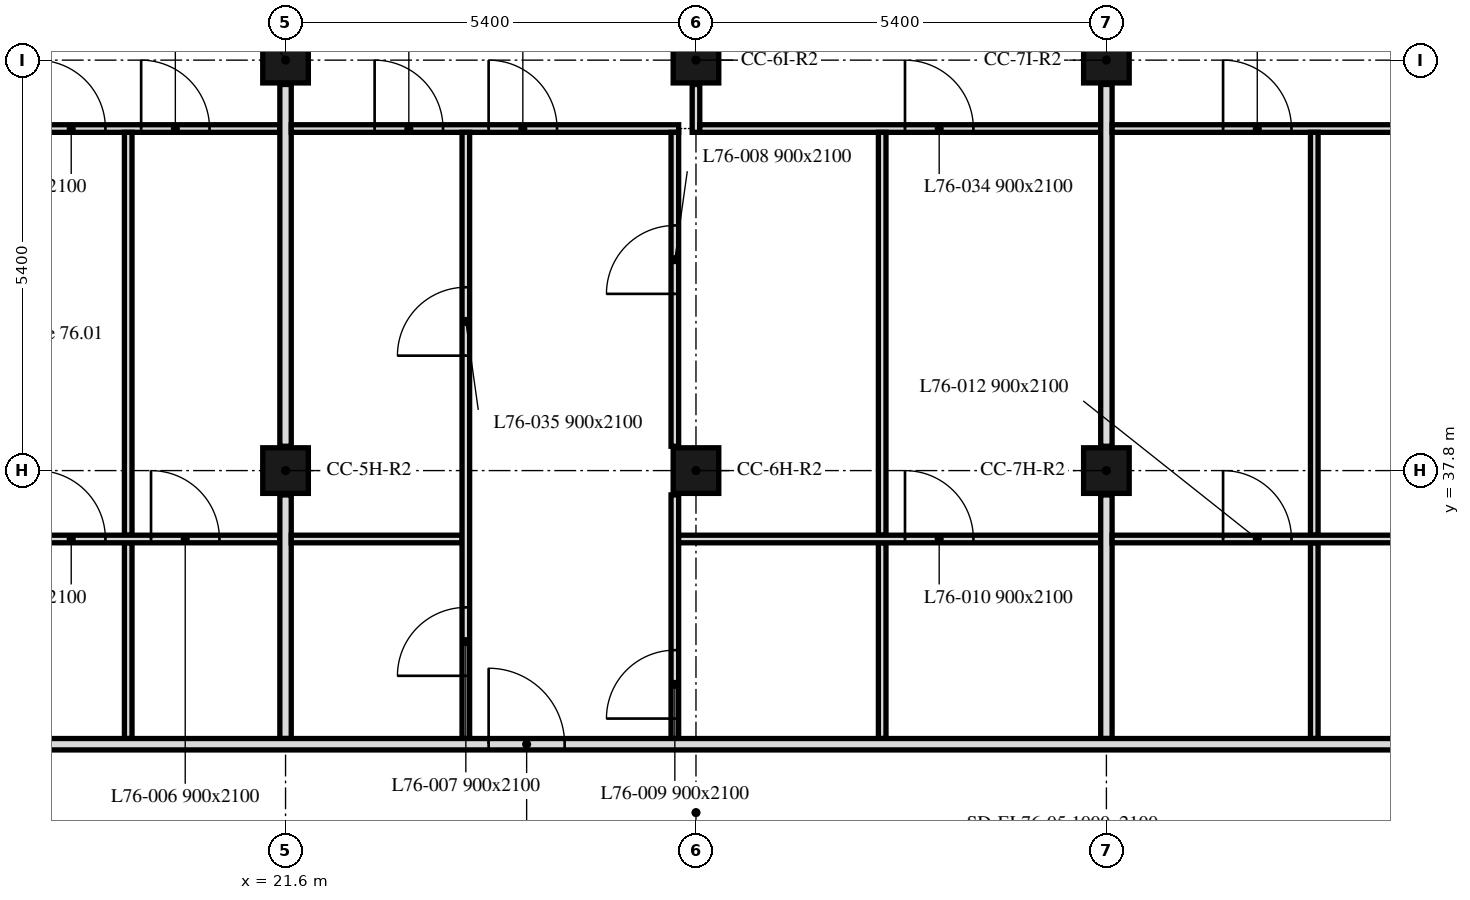
"""IFC4 building model, lengths in metres.
Left out: names, types, materials, properties, quantities, classifications, styles, units other than length and angle.
Written with IfcOpenShell. Run it as: python <this file> out.ifc"""

import sys

from ifc_helpers import new_model, si_unit, direction, frame, frame_2d, origin, origin_2d, place, context, subcontext, project, spatial, rectangle, extrude, element, fill, save


model = new_model("IFC4")
c1 = context("Model", 3, precision=1e-05, world=origin(), true_north=direction((0.0, 1.0)))
c2 = subcontext(c1, "Body", "Model", "MODEL_VIEW")
j1 = project(units=[si_unit("LENGTHUNIT", "METRE"), si_unit("PLANEANGLEUNIT", "RADIAN")], contexts=[c1])
p1 = place(None, origin())
s1 = spatial("IfcSite", under=j1, at=p1, CompositionType="ELEMENT")
p2 = place(p1, origin())
s2 = spatial("IfcBuilding", under=s1, at=p2, CompositionType="ELEMENT")
p3 = place(p2, frame((0.0, 0.0, 304.9)))
s3 = spatial("IfcBuildingStorey", under=s2, at=p3, CompositionType="ELEMENT", Elevation=304.9)
for number, where, z_axis, x_axis in (
    (1, (21.6, 37.8, 0.0), (0.0, 0.0, 1.0), (1.0, 0.0, 0.0)),
    (2, (27.0, 37.8, 0.0), (0.0, 0.0, 1.0), (1.0, 0.0, 0.0)),
    (3, (32.4, 37.8, 0.0), (0.0, 0.0, 1.0), (1.0, 0.0, 0.0)),
    (4, (21.6, 43.2, 0.0), (0.0, 0.0, 1.0), (1.0, 0.0, 0.0)),
    (5, (27.0, 43.2, 0.0), (0.0, 0.0, 1.0), (1.0, 0.0, 0.0)),
    (6, (32.4, 43.2, 0.0), (0.0, 0.0, 1.0), (1.0, 0.0, 0.0)),
):
    element("IfcColumn", number, at=place(p3, frame(where, z_axis=z_axis, x_axis=x_axis)), inside=s3, PredefinedType="COLUMN", context=c2, shape_type="SweptSolid", body=[
        extrude(rectangle(XDim=0.6, YDim=0.6, at=origin_2d()), origin(), (0.0, 0.0, 1.0), 2.8),
    ])
p4 = place(p3, frame((16.25, 42.3, 0.0), z_axis=(0.0, 0.0, 1.0), x_axis=(1.0, 0.0, 0.0)))
e7 = element("IfcWall", 7, at=p4, inside=s3, PredefinedType="PARTITIONING", context=c2, shape_type="SweptSolid", body=[
    extrude(rectangle(XDim=5.275, YDim=0.1, at=frame_2d((2.637, 0.0))), origin(), (0.0, 0.0, 1.0), 2.8),
])
p5 = place(p4, frame((2.08, 0.0, 0.0)))
e8 = element("IfcOpeningElement", 8, at=p5, cuts=e7, PredefinedType="OPENING", context=c2, shape_type="SweptSolid", body=[
    extrude(rectangle(XDim=0.9, YDim=2.1, at=frame_2d((0.45, 1.05))), frame((0.0, 0.05, 0.0), z_axis=(0.0, -1.0, 0.0), x_axis=(1.0, 0.0, 0.0)), (0.0, 0.0, 1.0), 0.1),
])
p6 = place(p4, frame((3.45, 0.0, 0.0)))
e9 = element("IfcOpeningElement", 9, at=p6, cuts=e7, PredefinedType="OPENING", context=c2, shape_type="SweptSolid", body=[
    extrude(rectangle(XDim=0.9, YDim=2.1, at=frame_2d((0.45, 1.05))), frame((0.0, 0.05, 0.0), z_axis=(0.0, -1.0, 0.0), x_axis=(1.0, 0.0, 0.0)), (0.0, 0.0, 1.0), 0.1),
])
p7 = place(p3, frame((19.53, 36.95, 0.0), z_axis=(0.0, 0.0, 1.0), x_axis=(0.0, 1.0, 0.0)))
e10 = element("IfcWall", 10, at=p7, inside=s3, PredefinedType="PARTITIONING", context=c2, shape_type="SweptSolid", body=[
    extrude(rectangle(XDim=5.3, YDim=0.1, at=frame_2d((2.65, 0.0))), origin(), (0.0, 0.0, 1.0), 2.8),
])
p8 = place(p3, frame((19.53, 34.275, 0.0), z_axis=(0.0, 0.0, 1.0), x_axis=(0.0, 1.0, 0.0)))
e11 = element("IfcWall", 11, at=p8, inside=s3, PredefinedType="PARTITIONING", context=c2, shape_type="SweptSolid", body=[
    extrude(rectangle(XDim=2.575, YDim=0.1, at=frame_2d((1.288, 0.0))), origin(), (0.0, 0.0, 1.0), 2.8),
])
p9 = place(p3, frame((16.13, 36.9, 0.0), z_axis=(0.0, 0.0, 1.0), x_axis=(1.0, 0.0, 0.0)))
e12 = element("IfcWall", 12, at=p9, inside=s3, PredefinedType="PARTITIONING", context=c2, shape_type="SweptSolid", body=[
    extrude(rectangle(XDim=5.395, YDim=0.1, at=frame_2d((2.698, 0.0))), origin(), (0.0, 0.0, 1.0), 2.8),
])
p10 = place(p9, frame((2.2, 0.0, 0.0)))
e13 = element("IfcOpeningElement", 13, at=p10, cuts=e12, PredefinedType="OPENING", context=c2, shape_type="SweptSolid", body=[
    extrude(rectangle(XDim=0.9, YDim=2.1, at=frame_2d((0.45, 1.05))), frame((0.0, 0.05, 0.0), z_axis=(0.0, -1.0, 0.0), x_axis=(1.0, 0.0, 0.0)), (0.0, 0.0, 1.0), 0.1),
])
p11 = place(p9, frame((3.7, 0.0, 0.0)))
e14 = element("IfcOpeningElement", 14, at=p11, cuts=e12, PredefinedType="OPENING", context=c2, shape_type="SweptSolid", body=[
    extrude(rectangle(XDim=0.9, YDim=2.1, at=frame_2d((0.45, 1.05))), frame((0.0, 0.05, 0.0), z_axis=(0.0, -1.0, 0.0), x_axis=(1.0, 0.0, 0.0)), (0.0, 0.0, 1.0), 0.1),
])
p12 = place(p3, frame((21.6, 38.12, 0.0), z_axis=(0.0, 0.0, 1.0), x_axis=(0.0, 1.0, 0.0)))
e15 = element("IfcWall", 15, at=p12, inside=s3, PredefinedType="PARTITIONING", context=c2, shape_type="SweptSolid", body=[
    extrude(rectangle(XDim=4.76, YDim=0.15, at=frame_2d((2.38, 0.0))), origin(), (0.0, 0.0, 1.0), 2.2),
])
p13 = place(p3, frame((21.6, 34.275, 0.0), z_axis=(0.0, 0.0, 1.0), x_axis=(0.0, 1.0, 0.0)))
e16 = element("IfcWall", 16, at=p13, inside=s3, PredefinedType="PARTITIONING", context=c2, shape_type="SweptSolid", body=[
    extrude(rectangle(XDim=3.205, YDim=0.15, at=frame_2d((1.603, 0.0))), origin(), (0.0, 0.0, 1.0), 2.2),
])
p14 = place(p3, frame((21.675, 42.3, 0.0), z_axis=(0.0, 0.0, 1.0), x_axis=(1.0, 0.0, 0.0)))
e17 = element("IfcWall", 17, at=p14, inside=s3, PredefinedType="PARTITIONING", context=c2, shape_type="SweptSolid", body=[
    extrude(rectangle(XDim=5.097, YDim=0.1, at=frame_2d((2.548, 0.0))), origin(), (0.0, 0.0, 1.0), 2.8),
])
p15 = place(p14, frame((1.097, 0.0, 0.0)))
e18 = element("IfcOpeningElement", 18, at=p15, cuts=e17, PredefinedType="OPENING", context=c2, shape_type="SweptSolid", body=[
    extrude(rectangle(XDim=0.9, YDim=2.1, at=frame_2d((0.45, 1.05))), frame((0.0, 0.05, 0.0), z_axis=(0.0, -1.0, 0.0), x_axis=(1.0, 0.0, 0.0)), (0.0, 0.0, 1.0), 0.1),
])
p16 = place(p14, frame((2.597, 0.0, 0.0)))
e19 = element("IfcOpeningElement", 19, at=p16, cuts=e17, PredefinedType="OPENING", context=c2, shape_type="SweptSolid", body=[
    extrude(rectangle(XDim=0.9, YDim=2.1, at=frame_2d((0.45, 1.05))), frame((0.0, 0.05, 0.0), z_axis=(0.0, -1.0, 0.0), x_axis=(1.0, 0.0, 0.0)), (0.0, 0.0, 1.0), 0.1),
])
p17 = place(p3, frame((27.0, 42.25, 0.0), z_axis=(0.0, 0.0, 1.0), x_axis=(0.0, 1.0, 0.0)))
e20 = element("IfcWall", 20, at=p17, inside=s3, PredefinedType="PARTITIONING", context=c2, shape_type="SweptSolid", body=[
    extrude(rectangle(XDim=0.63, YDim=0.1, at=frame_2d((0.315, 0.0))), origin(), (0.0, 0.0, 1.0), 2.2),
])
p18 = place(p3, frame((27.05, 42.3, 0.0), z_axis=(0.0, 0.0, 1.0), x_axis=(1.0, 0.0, 0.0)))
e21 = element("IfcWall", 21, at=p18, inside=s3, PredefinedType="PARTITIONING", context=c2, shape_type="SweptSolid", body=[
    extrude(rectangle(XDim=5.275, YDim=0.1, at=frame_2d((2.637, 0.0))), origin(), (0.0, 0.0, 1.0), 2.8),
])
p19 = place(p18, frame((2.7, 0.0, 0.0)))
e22 = element("IfcOpeningElement", 22, at=p19, cuts=e21, PredefinedType="OPENING", context=c2, shape_type="SweptSolid", body=[
    extrude(rectangle(XDim=0.9, YDim=2.1, at=frame_2d((0.45, 1.05))), frame((0.0, 0.05, 0.0), z_axis=(0.0, -1.0, 0.0), x_axis=(1.0, 0.0, 0.0)), (0.0, 0.0, 1.0), 0.1),
])
p20 = place(p3, frame((21.675, 36.9, 0.0), z_axis=(0.0, 0.0, 1.0), x_axis=(1.0, 0.0, 0.0)))
e23 = element("IfcWall", 23, at=p20, inside=s3, PredefinedType="PARTITIONING", context=c2, shape_type="SweptSolid", body=[
    extrude(rectangle(XDim=2.247, YDim=0.1, at=frame_2d((1.124, 0.0))), origin(), (0.0, 0.0, 1.0), 2.8),
])
p21 = place(p3, frame((23.972, 34.275, 0.0), z_axis=(0.0, 0.0, 1.0), x_axis=(0.0, 1.0, 0.0)))
e24 = element("IfcWall", 24, at=p21, inside=s3, PredefinedType="PARTITIONING", context=c2, shape_type="SweptSolid", body=[
    extrude(rectangle(XDim=7.975, YDim=0.1, at=frame_2d((3.988, 0.0))), origin(), (0.0, 0.0, 1.0), 2.8),
])
p22 = place(p21, frame((0.825, 0.0, 0.0)))
e25 = element("IfcOpeningElement", 25, at=p22, cuts=e24, PredefinedType="OPENING", context=c2, shape_type="SweptSolid", body=[
    extrude(rectangle(XDim=0.9, YDim=2.1, at=frame_2d((0.45, 1.05))), frame((0.0, 0.05, 0.0), z_axis=(0.0, -1.0, 0.0), x_axis=(1.0, 0.0, 0.0)), (0.0, 0.0, 1.0), 0.1),
])
p23 = place(p21, frame((5.037, 0.0, 0.0)))
e26 = element("IfcOpeningElement", 26, at=p23, cuts=e24, PredefinedType="OPENING", context=c2, shape_type="SweptSolid", body=[
    extrude(rectangle(XDim=0.9, YDim=2.1, at=frame_2d((0.45, 1.05))), frame((0.0, 0.05, 0.0), z_axis=(0.0, -1.0, 0.0), x_axis=(1.0, 0.0, 0.0)), (0.0, 0.0, 1.0), 0.1),
])
p24 = place(p3, frame((26.722, 34.275, 0.0), z_axis=(0.0, 0.0, 1.0), x_axis=(0.0, 1.0, 0.0)))
e27 = element("IfcWall", 27, at=p24, inside=s3, PredefinedType="PARTITIONING", context=c2, shape_type="SweptSolid", body=[
    extrude(rectangle(XDim=3.205, YDim=0.1, at=frame_2d((1.603, 0.0))), origin(), (0.0, 0.0, 1.0), 2.8),
])
p25 = place(p24, frame((0.262, 0.0, 0.0)))
e28 = element("IfcOpeningElement", 28, at=p25, cuts=e27, PredefinedType="OPENING", context=c2, shape_type="SweptSolid", body=[
    extrude(rectangle(XDim=0.9, YDim=2.1, at=frame_2d((0.45, 1.05))), frame((0.0, 0.05, 0.0), z_axis=(0.0, -1.0, 0.0), x_axis=(1.0, 0.0, 0.0)), (0.0, 0.0, 1.0), 0.1),
])
p26 = place(p3, frame((26.722, 38.12, 0.0), z_axis=(0.0, 0.0, 1.0), x_axis=(0.0, 1.0, 0.0)))
e29 = element("IfcWall", 29, at=p26, inside=s3, PredefinedType="PARTITIONING", context=c2, shape_type="SweptSolid", body=[
    extrude(rectangle(XDim=4.13, YDim=0.1, at=frame_2d((2.065, 0.0))), origin(), (0.0, 0.0, 1.0), 2.8),
])
p27 = place(p26, frame((2.005, 0.0, 0.0)))
e30 = element("IfcOpeningElement", 30, at=p27, cuts=e29, PredefinedType="OPENING", context=c2, shape_type="SweptSolid", body=[
    extrude(rectangle(XDim=0.9, YDim=2.1, at=frame_2d((0.45, 1.05))), frame((0.0, 0.05, 0.0), z_axis=(0.0, -1.0, 0.0), x_axis=(1.0, 0.0, 0.0)), (0.0, 0.0, 1.0), 0.1),
])
p28 = place(p3, frame((29.45, 36.95, 0.0), z_axis=(0.0, 0.0, 1.0), x_axis=(0.0, 1.0, 0.0)))
e31 = element("IfcWall", 31, at=p28, inside=s3, PredefinedType="PARTITIONING", context=c2, shape_type="SweptSolid", body=[
    extrude(rectangle(XDim=5.3, YDim=0.1, at=frame_2d((2.65, 0.0))), origin(), (0.0, 0.0, 1.0), 2.8),
])
p29 = place(p3, frame((29.45, 34.275, 0.0), z_axis=(0.0, 0.0, 1.0), x_axis=(0.0, 1.0, 0.0)))
e32 = element("IfcWall", 32, at=p29, inside=s3, PredefinedType="PARTITIONING", context=c2, shape_type="SweptSolid", body=[
    extrude(rectangle(XDim=2.575, YDim=0.1, at=frame_2d((1.288, 0.0))), origin(), (0.0, 0.0, 1.0), 2.8),
])
p30 = place(p3, frame((26.772, 36.9, 0.0), z_axis=(0.0, 0.0, 1.0), x_axis=(1.0, 0.0, 0.0)))
e33 = element("IfcWall", 33, at=p30, inside=s3, PredefinedType="PARTITIONING", context=c2, shape_type="SweptSolid", body=[
    extrude(rectangle(XDim=5.553, YDim=0.1, at=frame_2d((2.776, 0.0))), origin(), (0.0, 0.0, 1.0), 2.2),
])
p31 = place(p30, frame((2.978, 0.0, 0.0)))
e34 = element("IfcOpeningElement", 34, at=p31, cuts=e33, PredefinedType="OPENING", context=c2, shape_type="SweptSolid", body=[
    extrude(rectangle(XDim=0.9, YDim=2.1, at=frame_2d((0.45, 1.05))), frame((0.0, 0.05, 0.0), z_axis=(0.0, -1.0, 0.0), x_axis=(1.0, 0.0, 0.0)), (0.0, 0.0, 1.0), 0.1),
])
p32 = place(p3, frame((32.4, 38.12, 0.0), z_axis=(0.0, 0.0, 1.0), x_axis=(0.0, 1.0, 0.0)))
e35 = element("IfcWall", 35, at=p32, inside=s3, PredefinedType="PARTITIONING", context=c2, shape_type="SweptSolid", body=[
    extrude(rectangle(XDim=4.76, YDim=0.15, at=frame_2d((2.38, 0.0))), origin(), (0.0, 0.0, 1.0), 2.2),
])
p33 = place(p3, frame((32.4, 34.275, 0.0), z_axis=(0.0, 0.0, 1.0), x_axis=(0.0, 1.0, 0.0)))
e36 = element("IfcWall", 36, at=p33, inside=s3, PredefinedType="PARTITIONING", context=c2, shape_type="SweptSolid", body=[
    extrude(rectangle(XDim=3.205, YDim=0.15, at=frame_2d((1.603, 0.0))), origin(), (0.0, 0.0, 1.0), 2.2),
])
p34 = place(p3, frame((32.475, 42.3, 0.0), z_axis=(0.0, 0.0, 1.0), x_axis=(1.0, 0.0, 0.0)))
e37 = element("IfcWall", 37, at=p34, inside=s3, PredefinedType="PARTITIONING", context=c2, shape_type="SweptSolid", body=[
    extrude(rectangle(XDim=5.21, YDim=0.1, at=frame_2d((2.605, 0.0))), origin(), (0.0, 0.0, 1.0), 2.8),
])
p35 = place(p34, frame((1.46, 0.0, 0.0)))
e38 = element("IfcOpeningElement", 38, at=p35, cuts=e37, PredefinedType="OPENING", context=c2, shape_type="SweptSolid", body=[
    extrude(rectangle(XDim=0.9, YDim=2.1, at=frame_2d((0.45, 1.05))), frame((0.0, 0.05, 0.0), z_axis=(0.0, -1.0, 0.0), x_axis=(1.0, 0.0, 0.0)), (0.0, 0.0, 1.0), 0.1),
])
p36 = place(p3, frame((35.135, 36.95, 0.0), z_axis=(0.0, 0.0, 1.0), x_axis=(0.0, 1.0, 0.0)))
e39 = element("IfcWall", 39, at=p36, inside=s3, PredefinedType="PARTITIONING", context=c2, shape_type="SweptSolid", body=[
    extrude(rectangle(XDim=5.3, YDim=0.1, at=frame_2d((2.65, 0.0))), origin(), (0.0, 0.0, 1.0), 2.2),
])
p37 = place(p3, frame((35.135, 34.275, 0.0), z_axis=(0.0, 0.0, 1.0), x_axis=(0.0, 1.0, 0.0)))
e40 = element("IfcWall", 40, at=p37, inside=s3, PredefinedType="PARTITIONING", context=c2, shape_type="SweptSolid", body=[
    extrude(rectangle(XDim=2.575, YDim=0.1, at=frame_2d((1.288, 0.0))), origin(), (0.0, 0.0, 1.0), 2.8),
])
p38 = place(p3, frame((32.475, 36.9, 0.0), z_axis=(0.0, 0.0, 1.0), x_axis=(1.0, 0.0, 0.0)))
e41 = element("IfcWall", 41, at=p38, inside=s3, PredefinedType="PARTITIONING", context=c2, shape_type="SweptSolid", body=[
    extrude(rectangle(XDim=5.11, YDim=0.1, at=frame_2d((2.555, 0.0))), origin(), (0.0, 0.0, 1.0), 2.8),
])
p39 = place(p38, frame((1.46, 0.0, 0.0)))
e42 = element("IfcOpeningElement", 42, at=p39, cuts=e41, PredefinedType="OPENING", context=c2, shape_type="SweptSolid", body=[
    extrude(rectangle(XDim=0.9, YDim=2.1, at=frame_2d((0.45, 1.05))), frame((0.0, 0.05, 0.0), z_axis=(0.0, -1.0, 0.0), x_axis=(1.0, 0.0, 0.0)), (0.0, 0.0, 1.0), 0.1),
])
p40 = place(p3, frame((6.151, 34.2, 0.0), z_axis=(0.0, 0.0, 1.0), x_axis=(1.0, 0.0, 0.0)))
e43 = element("IfcWall", 43, at=p40, inside=s3, PredefinedType="PARTITIONING", context=c2, shape_type="SweptSolid", body=[
    extrude(rectangle(XDim=41.698, YDim=0.15, at=frame_2d((20.849, 0.0))), origin(), (0.0, 0.0, 1.0), 2.2),
])
p41 = place(p40, frame((2.939, 0.0, 0.0)))
e44 = element("IfcOpeningElement", 44, at=p41, cuts=e43, PredefinedType="OPENING", context=c2, shape_type="SweptSolid", body=[
    extrude(rectangle(XDim=1.0, YDim=2.1, at=frame_2d((0.5, 1.05))), frame((0.0, 0.075, 0.0), z_axis=(0.0, -1.0, 0.0), x_axis=(1.0, 0.0, 0.0)), (0.0, 0.0, 1.0), 0.15),
])
p42 = place(p40, frame((18.121, 0.0, 0.0)))
e45 = element("IfcOpeningElement", 45, at=p42, cuts=e43, PredefinedType="OPENING", context=c2, shape_type="SweptSolid", body=[
    extrude(rectangle(XDim=1.0, YDim=2.1, at=frame_2d((0.5, 1.05))), frame((0.0, 0.075, 0.0), z_axis=(0.0, -1.0, 0.0), x_axis=(1.0, 0.0, 0.0)), (0.0, 0.0, 1.0), 0.15),
])
p43 = place(p40, frame((32.359, 0.0, 0.0)))
e46 = element("IfcOpeningElement", 46, at=p43, cuts=e43, PredefinedType="OPENING", context=c2, shape_type="SweptSolid", body=[
    extrude(rectangle(XDim=1.0, YDim=2.1, at=frame_2d((0.5, 1.05))), frame((0.0, 0.075, 0.0), z_axis=(0.0, -1.0, 0.0), x_axis=(1.0, 0.0, 0.0)), (0.0, 0.0, 1.0), 0.15),
])
p44 = place(p10, origin())
e47 = element("IfcDoor", 47, at=p44, inside=s3, OperationType="SINGLE_SWING_LEFT", PredefinedType="DOOR", context=c2, shape_type="SweptSolid", body=[
    extrude(rectangle(XDim=0.9, YDim=2.1, at=frame_2d((0.45, 1.05))), frame((0.0, 0.025, 0.0), z_axis=(0.0, -1.0, 0.0), x_axis=(1.0, 0.0, 0.0)), (0.0, 0.0, 1.0), 0.05),
])
fill(e13, e47)
p45 = place(p11, origin())
e48 = element("IfcDoor", 48, at=p45, inside=s3, OperationType="SINGLE_SWING_LEFT", PredefinedType="DOOR", context=c2, shape_type="SweptSolid", body=[
    extrude(rectangle(XDim=0.9, YDim=2.1, at=frame_2d((0.45, 1.05))), frame((0.0, 0.025, 0.0), z_axis=(0.0, -1.0, 0.0), x_axis=(1.0, 0.0, 0.0)), (0.0, 0.0, 1.0), 0.05),
])
fill(e14, e48)
p46 = place(p22, origin())
e49 = element("IfcDoor", 49, at=p46, inside=s3, OperationType="SINGLE_SWING_RIGHT", PredefinedType="DOOR", context=c2, shape_type="SweptSolid", body=[
    extrude(rectangle(XDim=0.9, YDim=2.1, at=frame_2d((0.45, 1.05))), frame((0.0, 0.025, 0.0), z_axis=(0.0, -1.0, 0.0), x_axis=(1.0, 0.0, 0.0)), (0.0, 0.0, 1.0), 0.05),
])
fill(e25, e49)
p47 = place(p27, origin())
e50 = element("IfcDoor", 50, at=p47, inside=s3, OperationType="SINGLE_SWING_LEFT", PredefinedType="DOOR", context=c2, shape_type="SweptSolid", body=[
    extrude(rectangle(XDim=0.9, YDim=2.1, at=frame_2d((0.45, 1.05))), frame((0.0, 0.025, 0.0), z_axis=(0.0, -1.0, 0.0), x_axis=(1.0, 0.0, 0.0)), (0.0, 0.0, 1.0), 0.05),
])
fill(e30, e50)
p48 = place(p25, origin())
e51 = element("IfcDoor", 51, at=p48, inside=s3, OperationType="SINGLE_SWING_LEFT", PredefinedType="DOOR", context=c2, shape_type="SweptSolid", body=[
    extrude(rectangle(XDim=0.9, YDim=2.1, at=frame_2d((0.45, 1.05))), frame((0.0, 0.025, 0.0), z_axis=(0.0, -1.0, 0.0), x_axis=(1.0, 0.0, 0.0)), (0.0, 0.0, 1.0), 0.05),
])
fill(e28, e51)
p49 = place(p31, origin())
e52 = element("IfcDoor", 52, at=p49, inside=s3, OperationType="SINGLE_SWING_LEFT", PredefinedType="DOOR", context=c2, shape_type="SweptSolid", body=[
    extrude(rectangle(XDim=0.9, YDim=2.1, at=frame_2d((0.45, 1.05))), frame((0.0, 0.025, 0.0), z_axis=(0.0, -1.0, 0.0), x_axis=(1.0, 0.0, 0.0)), (0.0, 0.0, 1.0), 0.05),
])
fill(e34, e52)
p50 = place(p39, origin())
e53 = element("IfcDoor", 53, at=p50, inside=s3, OperationType="SINGLE_SWING_LEFT", PredefinedType="DOOR", context=c2, shape_type="SweptSolid", body=[
    extrude(rectangle(XDim=0.9, YDim=2.1, at=frame_2d((0.45, 1.05))), frame((0.0, 0.025, 0.0), z_axis=(0.0, -1.0, 0.0), x_axis=(1.0, 0.0, 0.0)), (0.0, 0.0, 1.0), 0.05),
])
fill(e42, e53)
p51 = place(p5, origin())
e54 = element("IfcDoor", 54, at=p51, inside=s3, OperationType="SINGLE_SWING_RIGHT", PredefinedType="DOOR", context=c2, shape_type="SweptSolid", body=[
    extrude(rectangle(XDim=0.9, YDim=2.1, at=frame_2d((0.45, 1.05))), frame((0.0, 0.025, 0.0), z_axis=(0.0, -1.0, 0.0), x_axis=(1.0, 0.0, 0.0)), (0.0, 0.0, 1.0), 0.05),
])
fill(e8, e54)
p52 = place(p6, origin())
e55 = element("IfcDoor", 55, at=p52, inside=s3, OperationType="SINGLE_SWING_LEFT", PredefinedType="DOOR", context=c2, shape_type="SweptSolid", body=[
    extrude(rectangle(XDim=0.9, YDim=2.1, at=frame_2d((0.45, 1.05))), frame((0.0, 0.025, 0.0), z_axis=(0.0, -1.0, 0.0), x_axis=(1.0, 0.0, 0.0)), (0.0, 0.0, 1.0), 0.05),
])
fill(e9, e55)
p53 = place(p15, origin())
e56 = element("IfcDoor", 56, at=p53, inside=s3, OperationType="SINGLE_SWING_RIGHT", PredefinedType="DOOR", context=c2, shape_type="SweptSolid", body=[
    extrude(rectangle(XDim=0.9, YDim=2.1, at=frame_2d((0.45, 1.05))), frame((0.0, 0.025, 0.0), z_axis=(0.0, -1.0, 0.0), x_axis=(1.0, 0.0, 0.0)), (0.0, 0.0, 1.0), 0.05),
])
fill(e18, e56)
p54 = place(p19, origin())
e57 = element("IfcDoor", 57, at=p54, inside=s3, OperationType="SINGLE_SWING_LEFT", PredefinedType="DOOR", context=c2, shape_type="SweptSolid", body=[
    extrude(rectangle(XDim=0.9, YDim=2.1, at=frame_2d((0.45, 1.05))), frame((0.0, 0.025, 0.0), z_axis=(0.0, -1.0, 0.0), x_axis=(1.0, 0.0, 0.0)), (0.0, 0.0, 1.0), 0.05),
])
fill(e22, e57)
p55 = place(p23, origin())
e58 = element("IfcDoor", 58, at=p55, inside=s3, OperationType="SINGLE_SWING_LEFT", PredefinedType="DOOR", context=c2, shape_type="SweptSolid", body=[
    extrude(rectangle(XDim=0.9, YDim=2.1, at=frame_2d((0.45, 1.05))), frame((0.0, 0.025, 0.0), z_axis=(0.0, -1.0, 0.0), x_axis=(1.0, 0.0, 0.0)), (0.0, 0.0, 1.0), 0.05),
])
fill(e26, e58)
p56 = place(p35, origin())
e59 = element("IfcDoor", 59, at=p56, inside=s3, OperationType="SINGLE_SWING_RIGHT", PredefinedType="DOOR", context=c2, shape_type="SweptSolid", body=[
    extrude(rectangle(XDim=0.9, YDim=2.1, at=frame_2d((0.45, 1.05))), frame((0.0, 0.025, 0.0), z_axis=(0.0, -1.0, 0.0), x_axis=(1.0, 0.0, 0.0)), (0.0, 0.0, 1.0), 0.05),
])
fill(e38, e59)
p57 = place(p16, origin())
e60 = element("IfcDoor", 60, at=p57, inside=s3, OperationType="SINGLE_SWING_LEFT", PredefinedType="DOOR", context=c2, shape_type="SweptSolid", body=[
    extrude(rectangle(XDim=0.9, YDim=2.1, at=frame_2d((0.45, 1.05))), frame((0.0, 0.025, 0.0), z_axis=(0.0, -1.0, 0.0), x_axis=(1.0, 0.0, 0.0)), (0.0, 0.0, 1.0), 0.05),
])
fill(e19, e60)
p58 = place(p42, origin())
e61 = element("IfcDoor", 61, at=p58, inside=s3, OperationType="SINGLE_SWING_LEFT", PredefinedType="DOOR", context=c2, shape_type="SweptSolid", body=[
    extrude(rectangle(XDim=1.0, YDim=2.1, at=frame_2d((0.5, 1.05))), frame((0.0, 0.025, 0.0), z_axis=(0.0, -1.0, 0.0), x_axis=(1.0, 0.0, 0.0)), (0.0, 0.0, 1.0), 0.05),
])
fill(e45, e61)
save(model, sys.argv[1])
